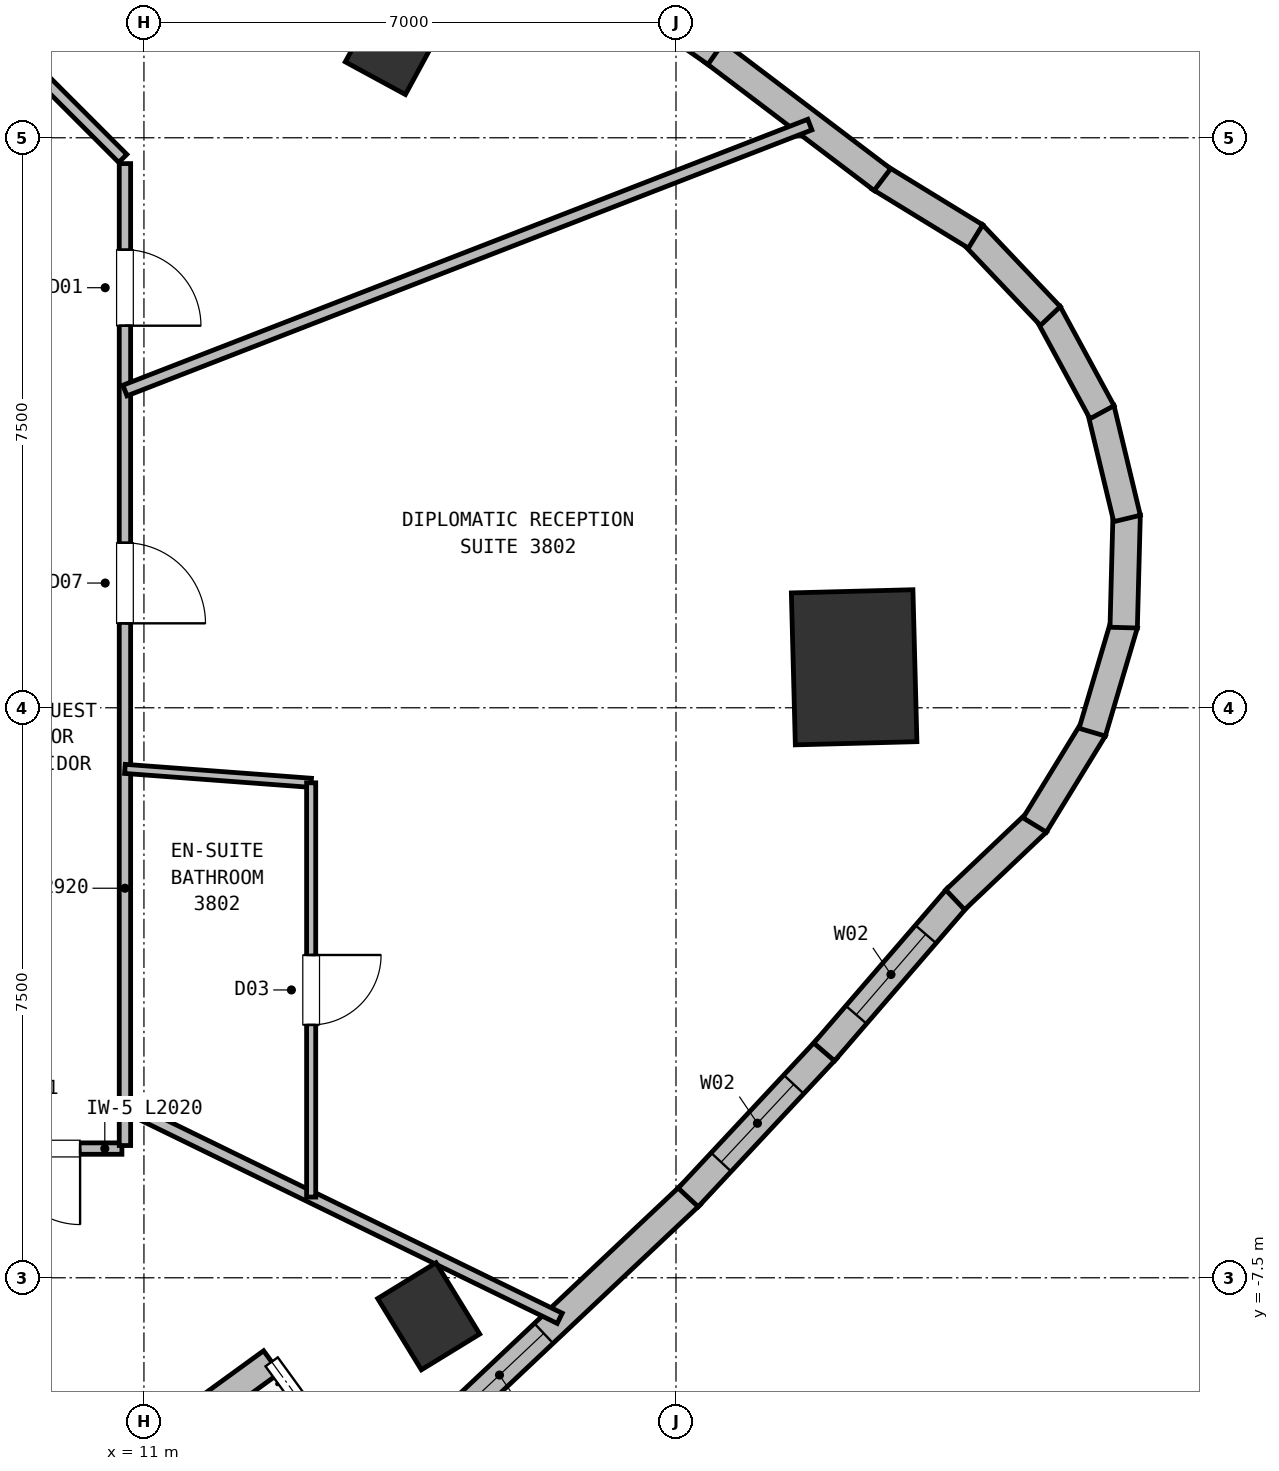
"""IFC4 building model, lengths in metres.
Left out: names, types, materials, properties, quantities, classifications, styles, units other than length and angle.
Written with IfcOpenShell. Run it as: python <this file> out.ifc"""

import sys

from ifc_helpers import new_model, si_unit, direction, frame, frame_2d, origin, origin_2d, place, context, subcontext, project, spatial, rectangle, extrude, element, fill, save


model = new_model("IFC4")
c1 = context("Model", 3, precision=1e-05, world=origin(), true_north=direction((0.0, 1.0)))
c2 = subcontext(c1, "Body", "Model", "MODEL_VIEW")
j1 = project(units=[si_unit("LENGTHUNIT", "METRE"), si_unit("PLANEANGLEUNIT", "RADIAN")], contexts=[c1])
p1 = place(None, origin())
s1 = spatial("IfcSite", under=j1, at=p1, CompositionType="ELEMENT")
p2 = place(p1, origin())
s2 = spatial("IfcBuilding", under=s1, at=p2, CompositionType="ELEMENT")
p3 = place(p2, frame((0.0, 0.0, 142.25)))
s3 = spatial("IfcBuildingStorey", under=s2, at=p3, CompositionType="ELEMENT", Elevation=142.25)
p4 = place(p3, frame((14.747, -8.007, 0.0), z_axis=(0.0, 0.0, 1.0), x_axis=(0.852640164354, 0.522498564716, 0.0)))
e1 = element("IfcColumn", 1, at=p4, inside=s3, PredefinedType="COLUMN", context=c2, shape_type="SweptSolid", body=[
    extrude(rectangle(XDim=0.9, YDim=1.1, at=origin_2d()), origin(), (0.0, 0.0, 1.0), 3.75),
])
p5 = place(p3, frame((20.344, 0.533, 0.0), z_axis=(0.0, 0.0, 1.0), x_axis=(0.999657324976, 0.026176948308, 0.0)))
e2 = element("IfcColumn", 2, at=p5, inside=s3, PredefinedType="COLUMN", context=c2, shape_type="SweptSolid", body=[
    extrude(rectangle(XDim=1.6, YDim=2.0, at=origin_2d()), origin(), (0.0, 0.0, 1.0), 3.75),
])
p6 = place(p3, frame((14.307, 8.767, 0.0), z_axis=(0.0, 0.0, 1.0), x_axis=(-0.878817112662, 0.47715876026, 0.0)))
e3 = element("IfcColumn", 3, at=p6, inside=s3, PredefinedType="COLUMN", context=c2, shape_type="SweptSolid", body=[
    extrude(rectangle(XDim=0.9, YDim=1.1, at=origin_2d()), origin(), (0.0, 0.0, 1.0), 3.75),
])
p7 = place(p3, frame((12.68, -8.606, 0.0), z_axis=(0.0, 0.0, 1.0), x_axis=(-0.809015154073, -0.587787785243, 0.0)))
e4 = element("IfcWall", 4, at=p7, inside=s3, PredefinedType="SOLIDWALL", context=c2, shape_type="SweptSolid", body=[
    extrude(rectangle(XDim=10.4, YDim=0.36, at=frame_2d((5.2, 0.0))), origin(), (0.0, 0.0, 1.0), 3.15),
])
p8 = place(p7, frame((3.6, 0.0, 0.0)))
e5 = element("IfcOpeningElement", 5, at=p8, cuts=e4, PredefinedType="OPENING", context=c2, shape_type="SweptSolid", body=[
    extrude(rectangle(XDim=1.65, YDim=2.25, at=frame_2d((0.825, 1.125))), frame((0.0, 0.19, 0.0), z_axis=(0.0, -1.0, 0.0), x_axis=(1.0, 0.0, 0.0)), (0.0, 0.0, 1.0), 0.38),
])
p9 = place(p3, frame((18.196, -6.407, 0.0), z_axis=(0.0, 0.0, 1.0), x_axis=(-0.727867791097, -0.685717491889, 0.0)))
e6 = element("IfcWall", 6, at=p9, inside=s3, PredefinedType="SOLIDWALL", context=c2, shape_type="SweptSolid", body=[
    extrude(rectangle(XDim=5.827, YDim=0.36, at=frame_2d((2.914, 0.0))), origin(), (0.0, 0.0, 1.0), 3.5),
])
p10 = place(p9, frame((2.66, 0.0, 0.72)))
e7 = element("IfcOpeningElement", 7, at=p10, cuts=e6, PredefinedType="OPENING", context=c2, shape_type="SweptSolid", body=[
    extrude(rectangle(XDim=1.6, YDim=1.88, at=frame_2d((0.8, 0.94))), frame((0.0, 0.19, 0.0), z_axis=(0.0, -1.0, 0.0), x_axis=(1.0, 0.0, 0.0)), (0.0, 0.0, 1.0), 0.38),
])
p11 = place(p3, frame((19.983, -4.491, 0.0), z_axis=(0.0, 0.0, 1.0), x_axis=(-0.682409479106, -0.730970110761, 0.0)))
e8 = element("IfcWall", 8, at=p11, inside=s3, PredefinedType="SOLIDWALL", context=c2, shape_type="SweptSolid", body=[
    extrude(rectangle(XDim=2.67, YDim=0.36, at=frame_2d((1.335, 0.0))), origin(), (0.0, 0.0, 1.0), 3.5),
])
p12 = place(p11, frame((0.635, 0.0, 0.72)))
e9 = element("IfcOpeningElement", 9, at=p12, cuts=e8, PredefinedType="OPENING", context=c2, shape_type="SweptSolid", body=[
    extrude(rectangle(XDim=1.4, YDim=1.84, at=frame_2d((0.7, 0.92))), frame((0.0, 0.19, 0.0), z_axis=(0.0, -1.0, 0.0), x_axis=(1.0, 0.0, 0.0)), (0.0, 0.0, 1.0), 0.38),
])
p13 = place(p3, frame((21.708, -2.49, 0.0), z_axis=(0.0, 0.0, 1.0), x_axis=(-0.653319915085, -0.757081956299, 0.0)))
e10 = element("IfcWall", 10, at=p13, inside=s3, PredefinedType="SOLIDWALL", context=c2, shape_type="SweptSolid", body=[
    extrude(rectangle(XDim=2.692, YDim=0.36, at=frame_2d((1.346, 0.0))), origin(), (0.0, 0.0, 1.0), 3.5),
])
p14 = place(p13, frame((0.646, 0.0, 0.72)))
e11 = element("IfcOpeningElement", 11, at=p14, cuts=e10, PredefinedType="OPENING", context=c2, shape_type="SweptSolid", body=[
    extrude(rectangle(XDim=1.4, YDim=1.84, at=frame_2d((0.7, 0.92))), frame((0.0, 0.19, 0.0), z_axis=(0.0, -1.0, 0.0), x_axis=(1.0, 0.0, 0.0)), (0.0, 0.0, 1.0), 0.38),
])
for number, where, z_axis, x_axis in (
    (12, (22.751, -1.504, 0.0), (0.0, 0.0, 1.0), (-0.725, -0.688, 0.0)),
    (13, (23.496, -0.276, 0.0), (0.0, 0.0, 1.0), (-0.523, -0.853, 0.0)),
    (14, (23.898, 1.104, 0.0), (0.0, 0.0, 1.0), (-0.284, -0.959, 0.0)),
    (15, (23.929, 2.54, 0.0), (0.0, 0.0, 1.0), (-0.026, -1.0, 0.0)),
):
    element("IfcWall", number, at=place(p3, frame(where, z_axis=z_axis, x_axis=x_axis)), inside=s3, PredefinedType="SOLIDWALL", context=c2, shape_type="SweptSolid", body=[
        extrude(rectangle(XDim=1.486, YDim=0.36, at=frame_2d((0.743, 0.0))), origin(), (0.0, 0.0, 1.0), 3.5),
    ])
for number, where, z_axis, x_axis in (
    (16, (23.588, 3.935, 0.0), (0.0, 0.0, 1.0), (0.233, -0.972, 0.0)),
    (17, (22.896, 5.195, 0.0), (0.0, 0.0, 1.0), (0.477, -0.879, 0.0)),
):
    element("IfcWall", number, at=place(p3, frame(where, z_axis=z_axis, x_axis=x_axis)), inside=s3, PredefinedType="SOLIDWALL", context=c2, shape_type="SweptSolid", body=[
        extrude(rectangle(XDim=1.486, YDim=0.36, at=frame_2d((0.743, 0.0))), origin(), (0.0, 0.0, 1.0), 3.5),
    ])
for number, where, z_axis, x_axis in (
    (18, (21.903, 6.232, 0.0), (0.0, 0.0, 1.0), (0.688, -0.725, 0.0)),
    (19, (20.674, 6.978, 0.0), (0.0, 0.0, 1.0), (0.853, -0.523, 0.0)),
):
    element("IfcWall", number, at=place(p3, frame(where, z_axis=z_axis, x_axis=x_axis)), inside=s3, PredefinedType="SOLIDWALL", context=c2, shape_type="SweptSolid", body=[
        extrude(rectangle(XDim=1.486, YDim=0.36, at=frame_2d((0.743, 0.0))), origin(), (0.0, 0.0, 1.0), 3.5),
    ])
p15 = place(p3, frame((18.483, 8.642, 0.0), z_axis=(0.0, 0.0, 1.0), x_axis=(0.796935762967, -0.604064060928, 0.0)))
e20 = element("IfcWall", 20, at=p15, inside=s3, PredefinedType="SOLIDWALL", context=c2, shape_type="SweptSolid", body=[
    extrude(rectangle(XDim=2.801, YDim=0.36, at=frame_2d((1.401, 0.0))), origin(), (0.0, 0.0, 1.0), 3.5),
])
p16 = place(p3, frame((16.244, 10.198, 0.0), z_axis=(0.0, 0.0, 1.0), x_axis=(0.820851453433, -0.5711417437, 0.0)))
e21 = element("IfcWall", 21, at=p16, inside=s3, PredefinedType="SOLIDWALL", context=c2, shape_type="SweptSolid", body=[
    extrude(rectangle(XDim=2.778, YDim=0.36, at=frame_2d((1.389, 0.0))), origin(), (0.0, 0.0, 1.0), 3.5),
])
p17 = place(p16, frame((0.589, 0.0, 0.72)))
e22 = element("IfcOpeningElement", 22, at=p17, cuts=e21, PredefinedType="OPENING", context=c2, shape_type="SweptSolid", body=[
    extrude(rectangle(XDim=1.6, YDim=1.88, at=frame_2d((0.8, 0.94))), frame((0.0, 0.19, 0.0), z_axis=(0.0, -1.0, 0.0), x_axis=(1.0, 0.0, 0.0)), (0.0, 0.0, 1.0), 0.38),
])
p18 = place(p3, frame((10.71, -5.8, 0.0), z_axis=(0.0, 0.0, 1.0), x_axis=(-1.0, 0.0, 0.0)))
e23 = element("IfcWall", 23, at=p18, inside=s3, PredefinedType="PARTITIONING", context=c2, shape_type="SweptSolid", body=[
    extrude(rectangle(XDim=2.02, YDim=0.15, at=frame_2d((1.01, 0.0))), origin(), (0.0, 0.0, 1.0), 3.5),
])
p19 = place(p18, frame((0.55, 0.0, 0.0)))
e24 = element("IfcOpeningElement", 24, at=p19, cuts=e23, PredefinedType="OPENING", context=c2, shape_type="SweptSolid", body=[
    extrude(rectangle(XDim=1.0, YDim=2.15, at=frame_2d((0.5, 1.075))), frame((0.0, 0.085, 0.0), z_axis=(0.0, -1.0, 0.0), x_axis=(1.0, 0.0, 0.0)), (0.0, 0.0, 1.0), 0.17),
])
p20 = place(p3, frame((10.75, 7.16, 0.0), z_axis=(0.0, 0.0, 1.0), x_axis=(0.0, -1.0, 0.0)))
e25 = element("IfcWall", 25, at=p20, inside=s3, PredefinedType="PARTITIONING", context=c2, shape_type="SweptSolid", body=[
    extrude(rectangle(XDim=12.92, YDim=0.15, at=frame_2d((6.46, 0.0))), origin(), (0.0, 0.0, 1.0), 3.5),
])
p21 = place(p20, frame((1.133, 0.0, 0.0)))
e26 = element("IfcOpeningElement", 26, at=p21, cuts=e25, PredefinedType="OPENING", context=c2, shape_type="SweptSolid", body=[
    extrude(rectangle(XDim=1.0, YDim=2.15, at=frame_2d((0.5, 1.075))), frame((0.0, 0.085, 0.0), z_axis=(0.0, -1.0, 0.0), x_axis=(1.0, 0.0, 0.0)), (0.0, 0.0, 1.0), 0.17),
])
p22 = place(p20, frame((4.989, 0.0, 0.0)))
e27 = element("IfcOpeningElement", 27, at=p22, cuts=e25, PredefinedType="OPENING", context=c2, shape_type="SweptSolid", body=[
    extrude(rectangle(XDim=1.06, YDim=2.15, at=frame_2d((0.53, 1.075))), frame((0.0, 0.085, 0.0), z_axis=(0.0, -1.0, 0.0), x_axis=(1.0, 0.0, 0.0)), (0.0, 0.0, 1.0), 0.17),
])
p23 = place(p3, frame((8.678, 9.272, 0.0), z_axis=(0.0, 0.0, 1.0), x_axis=(0.707106781187, -0.707106781187, 0.0)))
e28 = element("IfcWall", 28, at=p23, inside=s3, PredefinedType="PARTITIONING", context=c2, shape_type="SweptSolid", body=[
    extrude(rectangle(XDim=2.89, YDim=0.15, at=frame_2d((1.445, 0.0))), origin(), (0.0, 0.0, 1.0), 3.5),
])
p24 = place(p3, frame((10.75, -5.243, 0.0), z_axis=(0.0, 0.0, 1.0), x_axis=(0.898794987621, -0.438369216787, 0.0)))
e29 = element("IfcWall", 29, at=p24, inside=s3, PredefinedType="PARTITIONING", context=c2, shape_type="SweptSolid", body=[
    extrude(rectangle(XDim=6.365, YDim=0.15, at=frame_2d((3.182, 0.0))), origin(), (0.0, 0.0, 1.0), 3.5),
])
p25 = place(p3, frame((10.75, -0.804, 0.0), z_axis=(0.0, 0.0, 1.0), x_axis=(0.99721134034, -0.074629368868, 0.0)))
e30 = element("IfcWall", 30, at=p25, inside=s3, PredefinedType="PARTITIONING", context=c2, shape_type="SweptSolid", body=[
    extrude(rectangle(XDim=2.457, YDim=0.12, at=frame_2d((1.229, 0.0))), origin(), (0.0, 0.0, 1.0), 3.5),
])
p26 = place(p3, frame((13.2, -0.988, 0.0), z_axis=(0.0, 0.0, 1.0), x_axis=(0.0, -1.0, 0.0)))
e31 = element("IfcWall", 31, at=p26, inside=s3, PredefinedType="PARTITIONING", context=c2, shape_type="SweptSolid", body=[
    extrude(rectangle(XDim=5.45, YDim=0.12, at=frame_2d((2.725, 0.0))), origin(), (0.0, 0.0, 1.0), 3.5),
])
p27 = place(p26, frame((2.265, 0.0, 0.0)))
e32 = element("IfcOpeningElement", 32, at=p27, cuts=e31, PredefinedType="OPENING", context=c2, shape_type="SweptSolid", body=[
    extrude(rectangle(XDim=0.92, YDim=2.1, at=frame_2d((0.46, 1.05))), frame((0.0, 0.07, 0.0), z_axis=(0.0, -1.0, 0.0), x_axis=(1.0, 0.0, 0.0)), (0.0, 0.0, 1.0), 0.14),
])
p28 = place(p3, frame((10.75, 4.174, 0.0), z_axis=(0.0, 0.0, 1.0), x_axis=(0.932193195681, 0.361961111068, 0.0)))
e33 = element("IfcWall", 33, at=p28, inside=s3, PredefinedType="PARTITIONING", context=c2, shape_type="SweptSolid", body=[
    extrude(rectangle(XDim=9.666, YDim=0.15, at=frame_2d((4.833, 0.0))), origin(), (0.0, 0.0, 1.0), 3.5),
])
p29 = place(p10, origin())
e34 = element("IfcWindow", 34, at=p29, inside=s3, PartitioningType="SINGLE_PANEL", PredefinedType="WINDOW", context=c2, shape_type="SweptSolid", body=[
    extrude(rectangle(XDim=1.6, YDim=1.88, at=frame_2d((0.8, 0.94))), frame((0.0, 0.03, 0.0), z_axis=(0.0, -1.0, 0.0), x_axis=(1.0, 0.0, 0.0)), (0.0, 0.0, 1.0), 0.06),
])
fill(e7, e34)
p30 = place(p12, origin())
e35 = element("IfcWindow", 35, at=p30, inside=s3, PartitioningType="SINGLE_PANEL", PredefinedType="WINDOW", context=c2, shape_type="SweptSolid", body=[
    extrude(rectangle(XDim=1.4, YDim=1.84, at=frame_2d((0.7, 0.92))), frame((0.0, 0.03, 0.0), z_axis=(0.0, -1.0, 0.0), x_axis=(1.0, 0.0, 0.0)), (0.0, 0.0, 1.0), 0.06),
])
fill(e9, e35)
p31 = place(p14, origin())
e36 = element("IfcWindow", 36, at=p31, inside=s3, PartitioningType="SINGLE_PANEL", PredefinedType="WINDOW", context=c2, shape_type="SweptSolid", body=[
    extrude(rectangle(XDim=1.4, YDim=1.84, at=frame_2d((0.7, 0.92))), frame((0.0, 0.03, 0.0), z_axis=(0.0, -1.0, 0.0), x_axis=(1.0, 0.0, 0.0)), (0.0, 0.0, 1.0), 0.06),
])
fill(e11, e36)
p32 = place(p27, origin())
e37 = element("IfcDoor", 37, at=p32, inside=s3, OperationType="SINGLE_SWING_LEFT", PredefinedType="DOOR", context=c2, shape_type="SweptSolid", body=[
    extrude(rectangle(XDim=0.92, YDim=2.1, at=frame_2d((0.46, 1.05))), frame((0.0, 0.025, 0.0), z_axis=(0.0, -1.0, 0.0), x_axis=(1.0, 0.0, 0.0)), (0.0, 0.0, 1.0), 0.05),
])
fill(e32, e37)
p33 = place(p21, origin())
e38 = element("IfcDoor", 38, at=p33, inside=s3, OperationType="SINGLE_SWING_RIGHT", PredefinedType="DOOR", context=c2, shape_type="SweptSolid", body=[
    extrude(rectangle(XDim=1.0, YDim=2.15, at=frame_2d((0.5, 1.075))), frame((0.0, 0.025, 0.0), z_axis=(0.0, -1.0, 0.0), x_axis=(1.0, 0.0, 0.0)), (0.0, 0.0, 1.0), 0.05),
])
fill(e26, e38)
p34 = place(p19, origin())
e39 = element("IfcDoor", 39, at=p34, inside=s3, OperationType="SINGLE_SWING_LEFT", PredefinedType="DOOR", context=c2, shape_type="SweptSolid", body=[
    extrude(rectangle(XDim=1.0, YDim=2.15, at=frame_2d((0.5, 1.075))), frame((0.0, 0.025, 0.0), z_axis=(0.0, -1.0, 0.0), x_axis=(1.0, 0.0, 0.0)), (0.0, 0.0, 1.0), 0.05),
])
fill(e24, e39)
p35 = place(p22, origin())
e40 = element("IfcDoor", 40, at=p35, inside=s3, OperationType="SINGLE_SWING_RIGHT", PredefinedType="DOOR", context=c2, shape_type="SweptSolid", body=[
    extrude(rectangle(XDim=1.06, YDim=2.15, at=frame_2d((0.53, 1.075))), frame((0.0, 0.025, 0.0), z_axis=(0.0, -1.0, 0.0), x_axis=(1.0, 0.0, 0.0)), (0.0, 0.0, 1.0), 0.05),
])
fill(e27, e40)
save(model, sys.argv[1])
